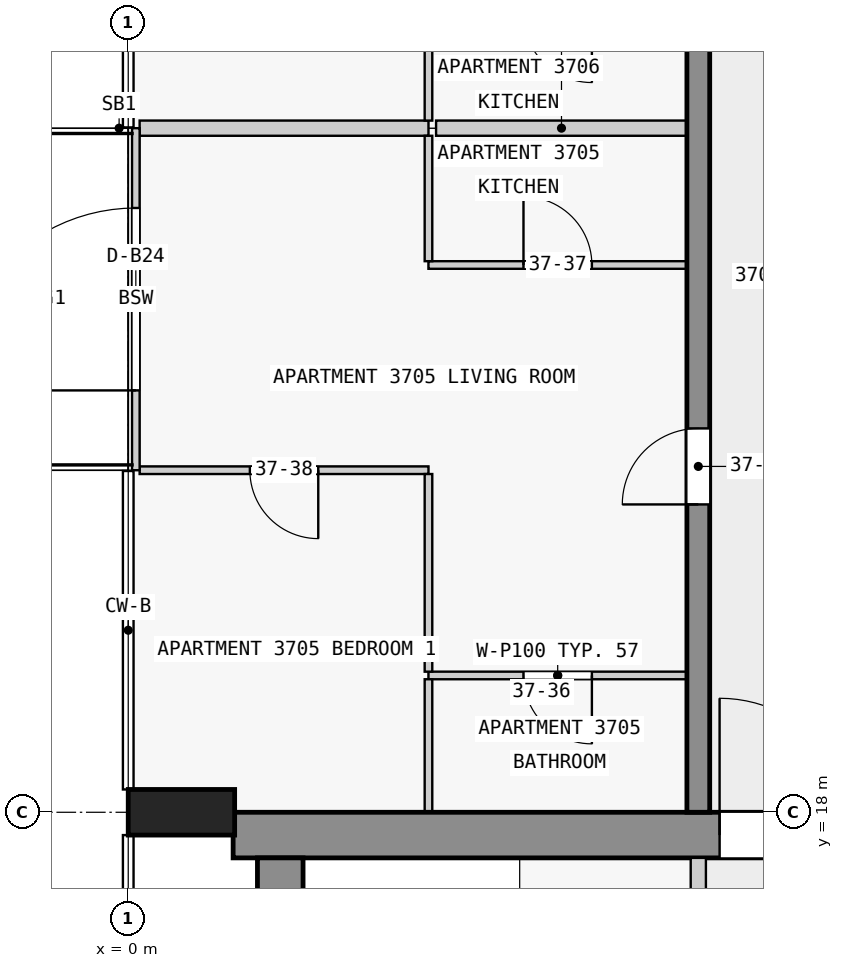
"""IFC4 building model, lengths in metres.
Left out: names, types, materials, properties, quantities, classifications, styles, units other than length and angle.
Written with IfcOpenShell. Run it as: python <this file> out.ifc"""

import sys

from ifc_helpers import new_model, si_unit, direction, frame, frame_2d, origin, origin_2d, place, context, subcontext, project, spatial, rectangle, extrude, element, fill, save


model = new_model("IFC4")
c1 = context("Model", 3, precision=1e-05, world=origin(), true_north=direction((0.0, 1.0)))
c2 = subcontext(c1, "Body", "Model", "MODEL_VIEW")
j1 = project(units=[si_unit("LENGTHUNIT", "METRE"), si_unit("PLANEANGLEUNIT", "RADIAN")], contexts=[c1])
p1 = place(None, origin())
s1 = spatial("IfcSite", under=j1, at=p1, CompositionType="ELEMENT")
p2 = place(p1, origin())
s2 = spatial("IfcBuilding", under=s1, at=p2, CompositionType="ELEMENT")
p3 = place(p2, frame((0.0, 0.0, 146.4)))
s3 = spatial("IfcBuildingStorey", under=s2, at=p3, CompositionType="ELEMENT", Elevation=146.4)
p4 = place(p3, frame((0.7, 18.0, 0.0), z_axis=(0.0, 0.0, 1.0), x_axis=(0.0, 1.0, 0.0)))
e1 = element("IfcColumn", 1, at=p4, inside=s3, PredefinedType="COLUMN", context=c2, shape_type="SweptSolid", body=[
    extrude(rectangle(XDim=0.6, YDim=1.4, at=origin_2d()), origin(), (0.0, 0.0, 1.0), 3.5),
])
p5 = place(p3, frame((1.38, 17.7, 0.0), z_axis=(0.0, 0.0, 1.0), x_axis=(1.0, 0.0, 0.0)))
e2 = element("IfcWall", 2, at=p5, inside=s3, PredefinedType="SHEAR", context=c2, shape_type="SweptSolid", body=[
    extrude(rectangle(XDim=21.12, YDim=0.6, at=frame_2d((10.56, 0.0))), origin(), (0.0, 0.0, 1.0), 3.25),
])
p6 = place(p5, frame((6.4, 0.0, 0.0)))
e3 = element("IfcOpeningElement", 3, at=p6, cuts=e2, PredefinedType="OPENING", context=c2, shape_type="SweptSolid", body=[
    extrude(rectangle(XDim=1.8, YDim=2.1, at=frame_2d((0.9, 1.05))), frame((0.0, 0.31, 0.0), z_axis=(0.0, -1.0, 0.0), x_axis=(1.0, 0.0, 0.0)), (0.0, 0.0, 1.0), 0.62),
])
p7 = place(p3, frame((2.0, 2.5, 0.0), z_axis=(0.0, 0.0, 1.0), x_axis=(0.0, 1.0, 0.0)))
e4 = element("IfcWall", 4, at=p7, inside=s3, PredefinedType="SHEAR", context=c2, shape_type="SweptSolid", body=[
    extrude(rectangle(XDim=14.9, YDim=0.6, at=frame_2d((7.45, 0.0))), origin(), (0.0, 0.0, 1.0), 3.25),
])
p8 = place(p3, frame((7.5, 18.0, 0.0), z_axis=(0.0, 0.0, 1.0), x_axis=(0.0, 1.0, 0.0)))
e5 = element("IfcWall", 5, at=p8, inside=s3, PredefinedType="SHEAR", context=c2, shape_type="SweptSolid", body=[
    extrude(rectangle(XDim=27.0, YDim=0.3, at=frame_2d((13.5, 0.0))), origin(), (0.0, 0.0, 1.0), 3.25),
])
p9 = place(p8, frame((4.05, 0.0, 0.0)))
e6 = element("IfcOpeningElement", 6, at=p9, cuts=e5, PredefinedType="OPENING", context=c2, shape_type="SweptSolid", body=[
    extrude(rectangle(XDim=1.0, YDim=2.1, at=frame_2d((0.5, 1.05))), frame((0.0, 0.16, 0.0), z_axis=(0.0, -1.0, 0.0), x_axis=(1.0, 0.0, 0.0)), (0.0, 0.0, 1.0), 0.32),
])
p10 = place(p8, frame((10.75, 0.0, 0.0)))
e7 = element("IfcOpeningElement", 7, at=p10, cuts=e5, PredefinedType="OPENING", context=c2, shape_type="SweptSolid", body=[
    extrude(rectangle(XDim=1.0, YDim=2.1, at=frame_2d((0.5, 1.05))), frame((0.0, 0.16, 0.0), z_axis=(0.0, -1.0, 0.0), x_axis=(1.0, 0.0, 0.0)), (0.0, 0.0, 1.0), 0.32),
])
p11 = place(p8, frame((17.55, 0.0, 0.0)))
e8 = element("IfcOpeningElement", 8, at=p11, cuts=e5, PredefinedType="OPENING", context=c2, shape_type="SweptSolid", body=[
    extrude(rectangle(XDim=1.0, YDim=2.1, at=frame_2d((0.5, 1.05))), frame((0.0, 0.16, 0.0), z_axis=(0.0, -1.0, 0.0), x_axis=(1.0, 0.0, 0.0)), (0.0, 0.0, 1.0), 0.32),
])
p12 = place(p8, frame((23.25, 0.0, 0.0)))
e9 = element("IfcOpeningElement", 9, at=p12, cuts=e5, PredefinedType="OPENING", context=c2, shape_type="SweptSolid", body=[
    extrude(rectangle(XDim=0.9, YDim=2.1, at=frame_2d((0.45, 1.05))), frame((0.0, 0.16, 0.0), z_axis=(0.0, -1.0, 0.0), x_axis=(1.0, 0.0, 0.0)), (0.0, 0.0, 1.0), 0.32),
])
p13 = place(p8, frame((25.45, 0.0, 0.0)))
e10 = element("IfcOpeningElement", 10, at=p13, cuts=e5, PredefinedType="OPENING", context=c2, shape_type="SweptSolid", body=[
    extrude(rectangle(XDim=1.0, YDim=2.1, at=frame_2d((0.5, 1.05))), frame((0.0, 0.16, 0.0), z_axis=(0.0, -1.0, 0.0), x_axis=(1.0, 0.0, 0.0)), (0.0, 0.0, 1.0), 0.32),
])
p14 = place(p3, frame((0.1, 22.5, 0.0), z_axis=(0.0, 0.0, 1.0), x_axis=(0.0, 1.0, 0.0)))
e11 = element("IfcWall", 11, at=p14, inside=s3, PredefinedType="STANDARD", context=c2, shape_type="SweptSolid", body=[
    extrude(rectangle(XDim=4.5, YDim=0.1, at=frame_2d((2.25, 0.0))), origin(), (0.0, 0.0, 1.0), 3.25),
])
p15 = place(p14, frame((1.05, 0.0, 0.0)))
e12 = element("IfcOpeningElement", 12, at=p15, cuts=e11, PredefinedType="OPENING", context=c2, shape_type="SweptSolid", body=[
    extrude(rectangle(XDim=2.4, YDim=2.4, at=frame_2d((1.2, 1.2))), frame((0.0, 0.06, 0.0), z_axis=(0.0, -1.0, 0.0), x_axis=(1.0, 0.0, 0.0)), (0.0, 0.0, 1.0), 0.12),
])
p16 = place(p3, frame((7.5, 10.1, 0.0), z_axis=(0.0, 0.0, 1.0), x_axis=(0.0, 1.0, 0.0)))
e13 = element("IfcWall", 13, at=p16, inside=s3, PredefinedType="PARTITIONING", context=c2, shape_type="SweptSolid", body=[
    extrude(rectangle(XDim=7.3, YDim=0.2, at=frame_2d((3.65, 0.0))), origin(), (0.0, 0.0, 1.0), 3.25),
])
p17 = place(p16, frame((0.75, 0.0, 0.0)))
e14 = element("IfcOpeningElement", 14, at=p17, cuts=e13, PredefinedType="OPENING", context=c2, shape_type="SweptSolid", body=[
    extrude(rectangle(XDim=0.9, YDim=2.1, at=frame_2d((0.45, 1.05))), frame((0.0, 0.11, 0.0), z_axis=(0.0, -1.0, 0.0), x_axis=(1.0, 0.0, 0.0)), (0.0, 0.0, 1.0), 0.22),
])
p18 = place(p16, frame((4.4, 0.0, 0.0)))
e15 = element("IfcOpeningElement", 15, at=p18, cuts=e13, PredefinedType="OPENING", context=c2, shape_type="SweptSolid", body=[
    extrude(rectangle(XDim=0.9, YDim=2.1, at=frame_2d((0.45, 1.05))), frame((0.0, 0.11, 0.0), z_axis=(0.0, -1.0, 0.0), x_axis=(1.0, 0.0, 0.0)), (0.0, 0.0, 1.0), 0.22),
])
p19 = place(p3, frame((7.35, 19.8, 0.0), z_axis=(0.0, 0.0, 1.0), x_axis=(-1.0, 0.0, 0.0)))
e16 = element("IfcWall", 16, at=p19, inside=s3, PredefinedType="PARTITIONING", context=c2, shape_type="SweptSolid", body=[
    extrude(rectangle(XDim=3.4, YDim=0.1, at=frame_2d((1.7, 0.0))), origin(), (0.0, 0.0, 1.0), 3.25),
])
p20 = place(p19, frame((1.25, 0.0, 0.0)))
e17 = element("IfcOpeningElement", 17, at=p20, cuts=e16, PredefinedType="OPENING", context=c2, shape_type="SweptSolid", body=[
    extrude(rectangle(XDim=0.9, YDim=2.1, at=frame_2d((0.45, 1.05))), frame((0.0, 0.06, 0.0), z_axis=(0.0, -1.0, 0.0), x_axis=(1.0, 0.0, 0.0)), (0.0, 0.0, 1.0), 0.12),
])
p21 = place(p3, frame((3.95, 22.5, 0.0), z_axis=(0.0, 0.0, 1.0), x_axis=(-1.0, 0.0, 0.0)))
e18 = element("IfcWall", 18, at=p21, inside=s3, PredefinedType="PARTITIONING", context=c2, shape_type="SweptSolid", body=[
    extrude(rectangle(XDim=3.8, YDim=0.1, at=frame_2d((1.9, 0.0))), origin(), (0.0, 0.0, 1.0), 3.25),
])
p22 = place(p21, frame((1.45, 0.0, 0.0)))
e19 = element("IfcOpeningElement", 19, at=p22, cuts=e18, PredefinedType="OPENING", context=c2, shape_type="SweptSolid", body=[
    extrude(rectangle(XDim=0.9, YDim=2.1, at=frame_2d((0.45, 1.05))), frame((0.0, 0.06, 0.0), z_axis=(0.0, -1.0, 0.0), x_axis=(1.0, 0.0, 0.0)), (0.0, 0.0, 1.0), 0.12),
])
p23 = place(p3, frame((3.95, 25.2, 0.0), z_axis=(0.0, 0.0, 1.0), x_axis=(1.0, 0.0, 0.0)))
e20 = element("IfcWall", 20, at=p23, inside=s3, PredefinedType="PARTITIONING", context=c2, shape_type="SweptSolid", body=[
    extrude(rectangle(XDim=3.4, YDim=0.1, at=frame_2d((1.7, 0.0))), origin(), (0.0, 0.0, 1.0), 3.25),
])
p24 = place(p23, frame((1.25, 0.0, 0.0)))
e21 = element("IfcOpeningElement", 21, at=p24, cuts=e20, PredefinedType="OPENING", context=c2, shape_type="SweptSolid", body=[
    extrude(rectangle(XDim=0.9, YDim=2.1, at=frame_2d((0.45, 1.05))), frame((0.0, 0.06, 0.0), z_axis=(0.0, -1.0, 0.0), x_axis=(1.0, 0.0, 0.0)), (0.0, 0.0, 1.0), 0.12),
])
p25 = place(p3, frame((7.35, 27.0, 0.0), z_axis=(0.0, 0.0, 1.0), x_axis=(-1.0, 0.0, 0.0)))
e22 = element("IfcWall", 22, at=p25, inside=s3, PredefinedType="PARTITIONING", context=c2, shape_type="SweptSolid", body=[
    extrude(rectangle(XDim=3.3, YDim=0.2, at=frame_2d((1.65, 0.0))), origin(), (0.0, 0.0, 1.0), 3.25),
])
p26 = place(p3, frame((0.15, 27.0, 0.0), z_axis=(0.0, 0.0, 1.0), x_axis=(1.0, 0.0, 0.0)))
e23 = element("IfcWall", 23, at=p26, inside=s3, PredefinedType="PARTITIONING", context=c2, shape_type="SweptSolid", body=[
    extrude(rectangle(XDim=3.8, YDim=0.2, at=frame_2d((1.9, 0.0))), origin(), (0.0, 0.0, 1.0), 3.25),
])
p27 = place(p3, frame((3.95, 19.75, 0.0), z_axis=(0.0, 0.0, 1.0), x_axis=(0.0, -1.0, 0.0)))
e24 = element("IfcWall", 24, at=p27, inside=s3, PredefinedType="PARTITIONING", context=c2, shape_type="SweptSolid", body=[
    extrude(rectangle(XDim=1.75, YDim=0.1, at=frame_2d((0.875, 0.0))), origin(), (0.0, 0.0, 1.0), 3.25),
])
p28 = place(p3, frame((3.95, 26.9, 0.0), z_axis=(0.0, 0.0, 1.0), x_axis=(0.0, -1.0, 0.0)))
e25 = element("IfcWall", 25, at=p28, inside=s3, PredefinedType="PARTITIONING", context=c2, shape_type="SweptSolid", body=[
    extrude(rectangle(XDim=1.65, YDim=0.1, at=frame_2d((0.825, 0.0))), origin(), (0.0, 0.0, 1.0), 3.25),
])
p29 = place(p3, frame((3.95, 28.45, 0.0), z_axis=(0.0, 0.0, 1.0), x_axis=(0.0, -1.0, 0.0)))
e26 = element("IfcWall", 26, at=p29, inside=s3, PredefinedType="PARTITIONING", context=c2, shape_type="SweptSolid", body=[
    extrude(rectangle(XDim=1.35, YDim=0.1, at=frame_2d((0.675, 0.0))), origin(), (0.0, 0.0, 1.0), 3.25),
])
p30 = place(p3, frame((3.95, 19.85, 0.0), z_axis=(0.0, 0.0, 1.0), x_axis=(0.0, 1.0, 0.0)))
e27 = element("IfcWall", 27, at=p30, inside=s3, PredefinedType="PARTITIONING", context=c2, shape_type="SweptSolid", body=[
    extrude(rectangle(XDim=2.6, YDim=0.1, at=frame_2d((1.3, 0.0))), origin(), (0.0, 0.0, 1.0), 3.25),
])
p31 = place(p15, origin())
e28 = element("IfcDoor", 28, at=p31, inside=s3, OperationType="SINGLE_SWING_LEFT", PredefinedType="DOOR", context=c2, shape_type="SweptSolid", body=[
    extrude(rectangle(XDim=2.4, YDim=2.4, at=frame_2d((1.2, 1.2))), frame((0.0, 0.025, 0.0), z_axis=(0.0, -1.0, 0.0), x_axis=(1.0, 0.0, 0.0)), (0.0, 0.0, 1.0), 0.05),
])
fill(e12, e28)
p32 = place(p6, origin())
e29 = element("IfcDoor", 29, at=p32, inside=s3, OperationType="DOUBLE_DOOR_SINGLE_SWING", PredefinedType="DOOR", context=c2, shape_type="SweptSolid", body=[
    extrude(rectangle(XDim=1.8, YDim=2.1, at=frame_2d((0.9, 1.05))), frame((0.0, 0.025, 0.0), z_axis=(0.0, -1.0, 0.0), x_axis=(1.0, 0.0, 0.0)), (0.0, 0.0, 1.0), 0.05),
])
fill(e3, e29)
p33 = place(p9, origin())
e30 = element("IfcDoor", 30, at=p33, inside=s3, OperationType="SINGLE_SWING_LEFT", PredefinedType="DOOR", context=c2, shape_type="SweptSolid", body=[
    extrude(rectangle(XDim=1.0, YDim=2.1, at=frame_2d((0.5, 1.05))), frame((0.0, 0.025, 0.0), z_axis=(0.0, -1.0, 0.0), x_axis=(1.0, 0.0, 0.0)), (0.0, 0.0, 1.0), 0.05),
])
fill(e6, e30)
p34 = place(p20, origin())
e31 = element("IfcDoor", 31, at=p34, inside=s3, OperationType="SINGLE_SWING_RIGHT", PredefinedType="DOOR", context=c2, shape_type="SweptSolid", body=[
    extrude(rectangle(XDim=0.9, YDim=2.1, at=frame_2d((0.45, 1.05))), frame((0.0, 0.025, 0.0), z_axis=(0.0, -1.0, 0.0), x_axis=(1.0, 0.0, 0.0)), (0.0, 0.0, 1.0), 0.05),
])
fill(e17, e31)
p35 = place(p24, origin())
e32 = element("IfcDoor", 32, at=p35, inside=s3, OperationType="SINGLE_SWING_RIGHT", PredefinedType="DOOR", context=c2, shape_type="SweptSolid", body=[
    extrude(rectangle(XDim=0.9, YDim=2.1, at=frame_2d((0.45, 1.05))), frame((0.0, 0.025, 0.0), z_axis=(0.0, -1.0, 0.0), x_axis=(1.0, 0.0, 0.0)), (0.0, 0.0, 1.0), 0.05),
])
fill(e21, e32)
p36 = place(p22, origin())
e33 = element("IfcDoor", 33, at=p36, inside=s3, OperationType="SINGLE_SWING_LEFT", PredefinedType="DOOR", context=c2, shape_type="SweptSolid", body=[
    extrude(rectangle(XDim=0.9, YDim=2.1, at=frame_2d((0.45, 1.05))), frame((0.0, 0.025, 0.0), z_axis=(0.0, -1.0, 0.0), x_axis=(1.0, 0.0, 0.0)), (0.0, 0.0, 1.0), 0.05),
])
fill(e19, e33)
save(model, sys.argv[1])
